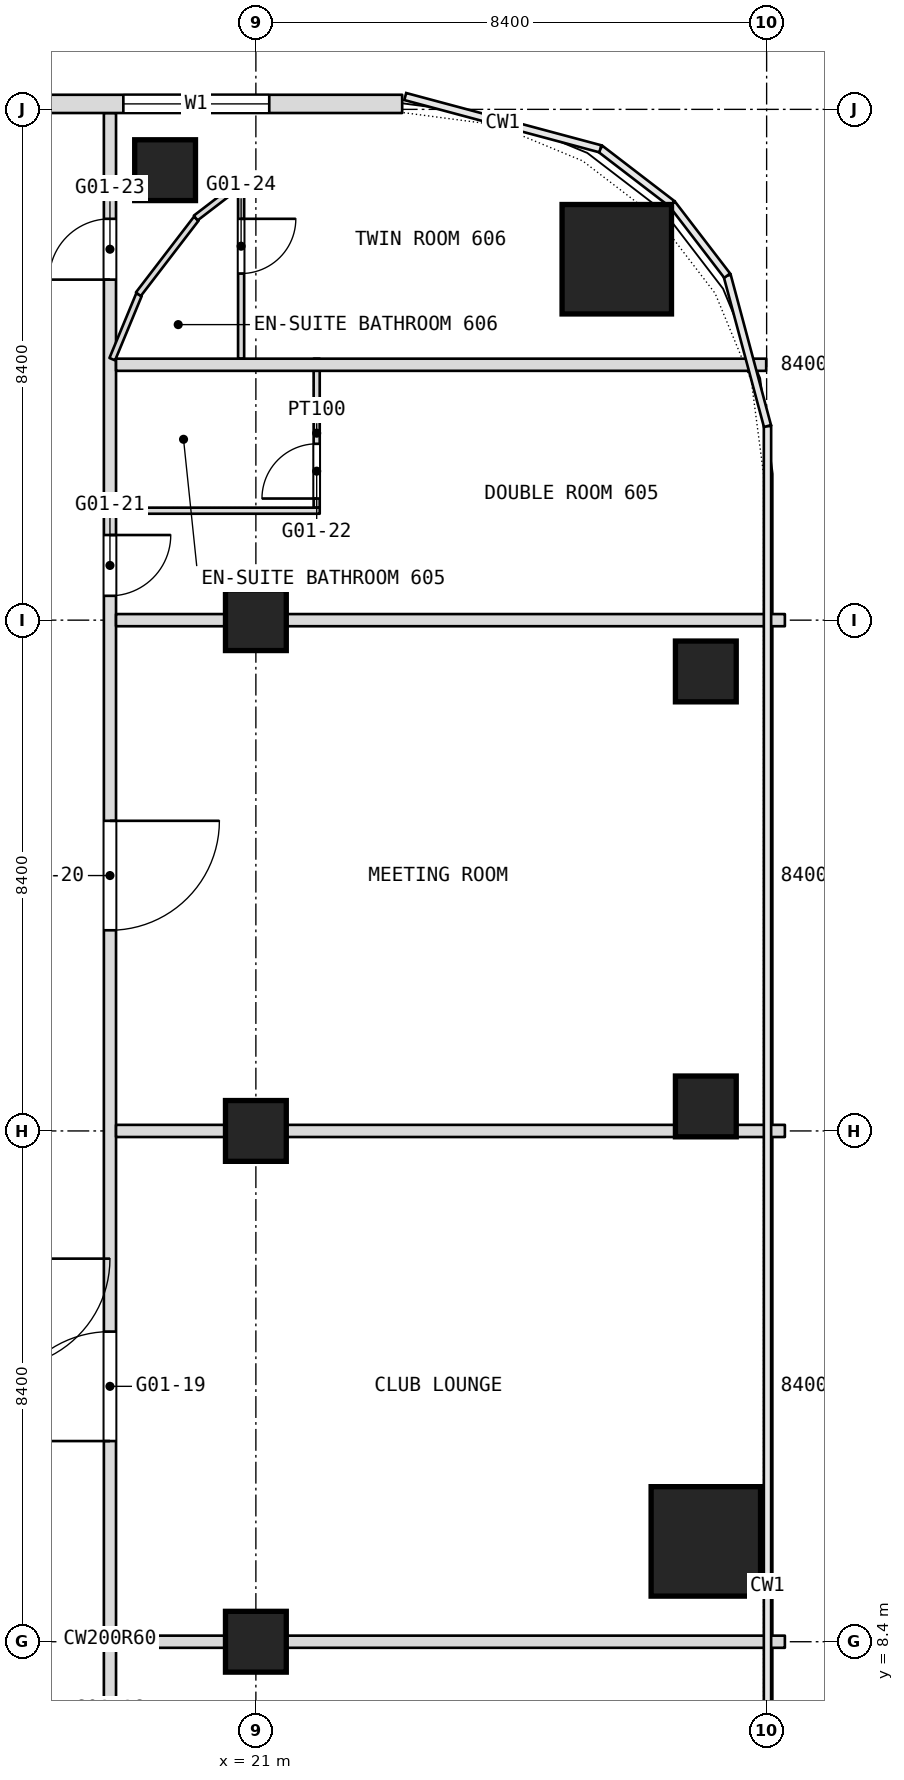
"""IFC4 building model, lengths in metres.
Left out: names, types, materials, properties, quantities, classifications, styles, units other than length and angle.
Written with IfcOpenShell. Run it as: python <this file> out.ifc"""

import sys

from ifc_helpers import new_model, si_unit, direction, frame, frame_2d, origin, origin_2d, place, context, subcontext, project, spatial, rectangle, extrude, element, fill, save


model = new_model("IFC4")
c1 = context("Model", 3, precision=1e-05, world=origin(), true_north=direction((0.0, 1.0)))
c2 = subcontext(c1, "Body", "Model", "MODEL_VIEW")
j1 = project(units=[si_unit("LENGTHUNIT", "METRE"), si_unit("PLANEANGLEUNIT", "RADIAN")], contexts=[c1])
p1 = place(None, origin())
s1 = spatial("IfcSite", under=j1, at=p1, CompositionType="ELEMENT")
p2 = place(p1, origin())
s2 = spatial("IfcBuilding", under=s1, at=p2, CompositionType="ELEMENT")
p3 = place(p2, frame((0.0, 0.0, 36.5)))
s3 = spatial("IfcBuildingStorey", under=s2, at=p3, CompositionType="ELEMENT", Elevation=36.5)
for number, where, z_axis, x_axis in (
    (1, (28.4, 10.05, 0.0), (0.0, 0.0, 1.0), (1.0, 0.0, 0.0)),
    (2, (26.936, 31.135, 0.0), (0.0, 0.0, 1.0), (1.0, 0.0, 0.0)),
):
    element("IfcColumn", number, at=place(p3, frame(where, z_axis=z_axis, x_axis=x_axis)), inside=s3, PredefinedType="COLUMN", context=c2, shape_type="SweptSolid", body=[
        extrude(rectangle(XDim=1.8, YDim=1.8, at=origin_2d()), origin(), (0.0, 0.0, 1.0), 3.6),
    ])
for number, where, z_axis, x_axis in (
    (3, (21.0, 8.4, 0.0), (0.0, 0.0, 1.0), (1.0, 0.0, 0.0)),
    (4, (21.0, 16.8, 0.0), (0.0, 0.0, 1.0), (1.0, 0.0, 0.0)),
    (5, (21.0, 25.2, 0.0), (0.0, 0.0, 1.0), (1.0, 0.0, 0.0)),
    (6, (19.507, 32.6, 0.0), (0.0, 0.0, 1.0), (1.0, 0.0, 0.0)),
    (7, (28.4, 24.356, 0.0), (0.0, 0.0, 1.0), (1.0, 0.0, 0.0)),
    (8, (28.4, 17.203, 0.0), (0.0, 0.0, 1.0), (1.0, 0.0, 0.0)),
):
    element("IfcColumn", number, at=place(p3, frame(where, z_axis=z_axis, x_axis=x_axis)), inside=s3, PredefinedType="COLUMN", context=c2, shape_type="SweptSolid", body=[
        extrude(rectangle(XDim=1.0, YDim=1.0, at=origin_2d()), origin(), (0.0, 0.0, 1.0), 3.6),
    ])
p4 = place(p3, frame((22.0, 27.05, 0.0), z_axis=(0.0, 0.0, 1.0), x_axis=(0.0, 1.0, 0.0)))
e9 = element("IfcWall", 9, at=p4, inside=s3, PredefinedType="PARTITIONING", context=c2, shape_type="SweptSolid", body=[
    extrude(rectangle(XDim=2.45, YDim=0.1, at=frame_2d((1.225, 0.0))), origin(), (0.0, 0.0, 1.0), 3.34),
])
p5 = place(p4, frame((0.15, 0.0, 0.0)))
e10 = element("IfcOpeningElement", 10, at=p5, cuts=e9, PredefinedType="OPENING", context=c2, shape_type="SweptSolid", body=[
    extrude(rectangle(XDim=0.9, YDim=2.1, at=frame_2d((0.45, 1.05))), frame((0.0, 0.05, 0.0), z_axis=(0.0, -1.0, 0.0), x_axis=(1.0, 0.0, 0.0)), (0.0, 0.0, 1.0), 0.1),
])
p6 = place(p3, frame((20.757, 29.5, 0.0), z_axis=(0.0, 0.0, 1.0), x_axis=(0.0, 1.0, 0.0)))
e11 = element("IfcWall", 11, at=p6, inside=s3, PredefinedType="PARTITIONING", context=c2, shape_type="SweptSolid", body=[
    extrude(rectangle(XDim=2.935, YDim=0.1, at=frame_2d((1.468, 0.0))), origin(), (0.0, 0.0, 1.0), 3.34),
])
p7 = place(p6, frame((1.4, 0.0, 0.0)))
e12 = element("IfcOpeningElement", 12, at=p7, cuts=e11, PredefinedType="OPENING", context=c2, shape_type="SweptSolid", body=[
    extrude(rectangle(XDim=0.9, YDim=2.1, at=frame_2d((0.45, 1.05))), frame((0.0, 0.05, 0.0), z_axis=(0.0, -1.0, 0.0), x_axis=(1.0, 0.0, 0.0)), (0.0, 0.0, 1.0), 0.1),
])
p8 = place(p3, frame((18.6, -16.665, 0.0), z_axis=(0.0, 0.0, 1.0), x_axis=(0.0, 1.0, 0.0)))
e13 = element("IfcWall", 13, at=p8, inside=s3, PredefinedType="PARTITIONING", context=c2, shape_type="SweptSolid", body=[
    extrude(rectangle(XDim=50.205, YDim=0.2, at=frame_2d((25.103, 0.0))), origin(), (0.0, 0.0, 1.0), 3.34),
])
p9 = place(p8, frame((2.991, 0.0, 0.0)))
e14 = element("IfcOpeningElement", 14, at=p9, cuts=e13, PredefinedType="OPENING", context=c2, shape_type="SweptSolid", body=[
    extrude(rectangle(XDim=1.0, YDim=2.1, at=frame_2d((0.5, 1.05))), frame((0.0, 0.1, 0.0), z_axis=(0.0, -1.0, 0.0), x_axis=(1.0, 0.0, 0.0)), (0.0, 0.0, 1.0), 0.2),
])
p10 = place(p8, frame((4.574, 0.0, 0.0)))
e15 = element("IfcOpeningElement", 15, at=p10, cuts=e13, PredefinedType="OPENING", context=c2, shape_type="SweptSolid", body=[
    extrude(rectangle(XDim=1.0, YDim=2.1, at=frame_2d((0.5, 1.05))), frame((0.0, 0.1, 0.0), z_axis=(0.0, -1.0, 0.0), x_axis=(1.0, 0.0, 0.0)), (0.0, 0.0, 1.0), 0.2),
])
p11 = place(p8, frame((11.865, 0.0, 0.0)))
e16 = element("IfcOpeningElement", 16, at=p11, cuts=e13, PredefinedType="OPENING", context=c2, shape_type="SweptSolid", body=[
    extrude(rectangle(XDim=1.1, YDim=2.1, at=frame_2d((0.55, 1.05))), frame((0.0, 0.1, 0.0), z_axis=(0.0, -1.0, 0.0), x_axis=(1.0, 0.0, 0.0)), (0.0, 0.0, 1.0), 0.2),
])
p12 = place(p8, frame((22.415, 0.0, 0.0)))
e17 = element("IfcOpeningElement", 17, at=p12, cuts=e13, PredefinedType="OPENING", context=c2, shape_type="SweptSolid", body=[
    extrude(rectangle(XDim=1.1, YDim=2.1, at=frame_2d((0.55, 1.05))), frame((0.0, 0.1, 0.0), z_axis=(0.0, -1.0, 0.0), x_axis=(1.0, 0.0, 0.0)), (0.0, 0.0, 1.0), 0.2),
])
p13 = place(p8, frame((28.365, 0.0, 0.0)))
e18 = element("IfcOpeningElement", 18, at=p13, cuts=e13, PredefinedType="OPENING", context=c2, shape_type="SweptSolid", body=[
    extrude(rectangle(XDim=1.8, YDim=2.1, at=frame_2d((0.9, 1.05))), frame((0.0, 0.1, 0.0), z_axis=(0.0, -1.0, 0.0), x_axis=(1.0, 0.0, 0.0)), (0.0, 0.0, 1.0), 0.2),
])
p14 = place(p8, frame((36.765, 0.0, 0.0)))
e19 = element("IfcOpeningElement", 19, at=p14, cuts=e13, PredefinedType="OPENING", context=c2, shape_type="SweptSolid", body=[
    extrude(rectangle(XDim=1.8, YDim=2.1, at=frame_2d((0.9, 1.05))), frame((0.0, 0.1, 0.0), z_axis=(0.0, -1.0, 0.0), x_axis=(1.0, 0.0, 0.0)), (0.0, 0.0, 1.0), 0.2),
])
p15 = place(p8, frame((42.265, 0.0, 0.0)))
e20 = element("IfcOpeningElement", 20, at=p15, cuts=e13, PredefinedType="OPENING", context=c2, shape_type="SweptSolid", body=[
    extrude(rectangle(XDim=1.0, YDim=2.1, at=frame_2d((0.5, 1.05))), frame((0.0, 0.1, 0.0), z_axis=(0.0, -1.0, 0.0), x_axis=(1.0, 0.0, 0.0)), (0.0, 0.0, 1.0), 0.2),
])
p16 = place(p8, frame((47.465, 0.0, 0.0)))
e21 = element("IfcOpeningElement", 21, at=p16, cuts=e13, PredefinedType="OPENING", context=c2, shape_type="SweptSolid", body=[
    extrude(rectangle(XDim=1.0, YDim=2.1, at=frame_2d((0.5, 1.05))), frame((0.0, 0.1, 0.0), z_axis=(0.0, -1.0, 0.0), x_axis=(1.0, 0.0, 0.0)), (0.0, 0.0, 1.0), 0.2),
])
p17 = place(p3, frame((18.638, 29.492, 0.0), z_axis=(0.0, 0.0, 1.0), x_axis=(0.382714431757, 0.923866691533, 0.0)))
e22 = element("IfcWall", 22, at=p17, inside=s3, PredefinedType="PARTITIONING", context=c2, shape_type="SweptSolid", body=[
    extrude(rectangle(XDim=1.149, YDim=0.1, at=frame_2d((0.575, 0.0))), origin(), (0.0, 0.0, 1.0), 3.34),
])
p18 = place(p3, frame((19.067, 30.56, 0.0), z_axis=(0.0, 0.0, 1.0), x_axis=(0.608519892166, 0.793538619626, 0.0)))
e23 = element("IfcWall", 23, at=p18, inside=s3, PredefinedType="PARTITIONING", context=c2, shape_type="SweptSolid", body=[
    extrude(rectangle(XDim=1.566, YDim=0.1, at=frame_2d((0.783, 0.0))), origin(), (0.0, 0.0, 1.0), 3.34),
])
p19 = place(p3, frame((18.7, 8.4, 0.0), z_axis=(0.0, 0.0, 1.0), x_axis=(1.0, 0.0, 0.0)))
e24 = element("IfcWall", 24, at=p19, inside=s3, PredefinedType="PARTITIONING", context=c2, shape_type="SweptSolid", body=[
    extrude(rectangle(XDim=11.0, YDim=0.2, at=frame_2d((5.5, 0.0))), origin(), (0.0, 0.0, 1.0), 2.84),
])
p20 = place(p3, frame((20.01, 31.813, 0.0), z_axis=(0.0, 0.0, 1.0), x_axis=(0.793641646693, 0.608385516457, 0.0)))
e25 = element("IfcWall", 25, at=p20, inside=s3, PredefinedType="PARTITIONING", context=c2, shape_type="SweptSolid", body=[
    extrude(rectangle(XDim=0.891, YDim=0.1, at=frame_2d((0.445, 0.0))), origin(), (0.0, 0.0, 1.0), 3.34),
])
for number, where, z_axis, x_axis in (
    (26, (18.7, 16.8, 0.0), (0.0, 0.0, 1.0), (1.0, 0.0, 0.0)),
    (27, (18.7, 25.2, 0.0), (0.0, 0.0, 1.0), (1.0, 0.0, 0.0)),
):
    element("IfcWall", number, at=place(p3, frame(where, z_axis=z_axis, x_axis=x_axis)), inside=s3, PredefinedType="PARTITIONING", context=c2, shape_type="SweptSolid", body=[
        extrude(rectangle(XDim=11.0, YDim=0.2, at=frame_2d((5.5, 0.0))), origin(), (0.0, 0.0, 1.0), 2.84),
    ])
p21 = place(p3, frame((18.7, 27.0, 0.0), z_axis=(0.0, 0.0, 1.0), x_axis=(1.0, 0.0, 0.0)))
e28 = element("IfcWall", 28, at=p21, inside=s3, PredefinedType="PARTITIONING", context=c2, shape_type="SweptSolid", body=[
    extrude(rectangle(XDim=3.35, YDim=0.1, at=frame_2d((1.675, 0.0))), origin(), (0.0, 0.0, 1.0), 3.34),
])
p22 = place(p3, frame((18.7, 29.4, 0.0), z_axis=(0.0, 0.0, 1.0), x_axis=(1.0, 0.0, 0.0)))
e29 = element("IfcWall", 29, at=p22, inside=s3, PredefinedType="PARTITIONING", context=c2, shape_type="SweptSolid", body=[
    extrude(rectangle(XDim=10.693, YDim=0.2, at=frame_2d((5.347, 0.0))), origin(), (0.0, 0.0, 1.0), 3.34),
])
p23 = place(p3, frame((23.406, 33.69, 0.0), z_axis=(0.0, 0.0, 1.0), x_axis=(-1.0, 0.0, 0.0)))
e30 = element("IfcWall", 30, at=p23, inside=s3, PredefinedType="NOTDEFINED", context=c2, shape_type="SweptSolid", body=[
    extrude(rectangle(XDim=46.812, YDim=0.3, at=frame_2d((23.406, 0.0))), origin(), (0.0, 0.0, 1.0), 3.6),
])
p24 = place(p23, frame((2.186, 0.0, 0.9)))
e31 = element("IfcOpeningElement", 31, at=p24, cuts=e30, PredefinedType="OPENING", context=c2, shape_type="SweptSolid", body=[
    extrude(rectangle(XDim=2.4, YDim=2.1, at=frame_2d((1.2, 1.05))), frame((0.0, 0.15, 0.0), z_axis=(0.0, -1.0, 0.0), x_axis=(1.0, 0.0, 0.0)), (0.0, 0.0, 1.0), 0.3),
])
p25 = place(p23, frame((7.506, 0.0, 0.9)))
e32 = element("IfcOpeningElement", 32, at=p25, cuts=e30, PredefinedType="OPENING", context=c2, shape_type="SweptSolid", body=[
    extrude(rectangle(XDim=2.4, YDim=2.1, at=frame_2d((1.2, 1.05))), frame((0.0, 0.15, 0.0), z_axis=(0.0, -1.0, 0.0), x_axis=(1.0, 0.0, 0.0)), (0.0, 0.0, 1.0), 0.3),
])
p26 = place(p23, frame((11.706, 0.0, 0.9)))
e33 = element("IfcOpeningElement", 33, at=p26, cuts=e30, PredefinedType="OPENING", context=c2, shape_type="SweptSolid", body=[
    extrude(rectangle(XDim=2.4, YDim=2.1, at=frame_2d((1.2, 1.05))), frame((0.0, 0.15, 0.0), z_axis=(0.0, -1.0, 0.0), x_axis=(1.0, 0.0, 0.0)), (0.0, 0.0, 1.0), 0.3),
])
p27 = place(p23, frame((15.906, 0.0, 0.9)))
e34 = element("IfcOpeningElement", 34, at=p27, cuts=e30, PredefinedType="OPENING", context=c2, shape_type="SweptSolid", body=[
    extrude(rectangle(XDim=2.4, YDim=2.1, at=frame_2d((1.2, 1.05))), frame((0.0, 0.15, 0.0), z_axis=(0.0, -1.0, 0.0), x_axis=(1.0, 0.0, 0.0)), (0.0, 0.0, 1.0), 0.3),
])
p28 = place(p23, frame((20.106, 0.0, 0.9)))
e35 = element("IfcOpeningElement", 35, at=p28, cuts=e30, PredefinedType="OPENING", context=c2, shape_type="SweptSolid", body=[
    extrude(rectangle(XDim=2.4, YDim=2.1, at=frame_2d((1.2, 1.05))), frame((0.0, 0.15, 0.0), z_axis=(0.0, -1.0, 0.0), x_axis=(1.0, 0.0, 0.0)), (0.0, 0.0, 1.0), 0.3),
])
p29 = place(p23, frame((24.306, 0.0, 0.9)))
e36 = element("IfcOpeningElement", 36, at=p29, cuts=e30, PredefinedType="OPENING", context=c2, shape_type="SweptSolid", body=[
    extrude(rectangle(XDim=2.4, YDim=2.1, at=frame_2d((1.2, 1.05))), frame((0.0, 0.15, 0.0), z_axis=(0.0, -1.0, 0.0), x_axis=(1.0, 0.0, 0.0)), (0.0, 0.0, 1.0), 0.3),
])
p30 = place(p23, frame((28.506, 0.0, 0.9)))
e37 = element("IfcOpeningElement", 37, at=p30, cuts=e30, PredefinedType="OPENING", context=c2, shape_type="SweptSolid", body=[
    extrude(rectangle(XDim=2.4, YDim=2.1, at=frame_2d((1.2, 1.05))), frame((0.0, 0.15, 0.0), z_axis=(0.0, -1.0, 0.0), x_axis=(1.0, 0.0, 0.0)), (0.0, 0.0, 1.0), 0.3),
])
p31 = place(p23, frame((32.706, 0.0, 0.9)))
e38 = element("IfcOpeningElement", 38, at=p31, cuts=e30, PredefinedType="OPENING", context=c2, shape_type="SweptSolid", body=[
    extrude(rectangle(XDim=2.4, YDim=2.1, at=frame_2d((1.2, 1.05))), frame((0.0, 0.15, 0.0), z_axis=(0.0, -1.0, 0.0), x_axis=(1.0, 0.0, 0.0)), (0.0, 0.0, 1.0), 0.3),
])
p32 = place(p23, frame((36.906, 0.0, 0.9)))
e39 = element("IfcOpeningElement", 39, at=p32, cuts=e30, PredefinedType="OPENING", context=c2, shape_type="SweptSolid", body=[
    extrude(rectangle(XDim=2.4, YDim=2.1, at=frame_2d((1.2, 1.05))), frame((0.0, 0.15, 0.0), z_axis=(0.0, -1.0, 0.0), x_axis=(1.0, 0.0, 0.0)), (0.0, 0.0, 1.0), 0.3),
])
p33 = place(p23, frame((42.226, 0.0, 0.9)))
e40 = element("IfcOpeningElement", 40, at=p33, cuts=e30, PredefinedType="OPENING", context=c2, shape_type="SweptSolid", body=[
    extrude(rectangle(XDim=2.4, YDim=2.1, at=frame_2d((1.2, 1.05))), frame((0.0, 0.15, 0.0), z_axis=(0.0, -1.0, 0.0), x_axis=(1.0, 0.0, 0.0)), (0.0, 0.0, 1.0), 0.3),
])
p34 = place(p5, origin())
e41 = element("IfcDoor", 41, at=p34, inside=s3, OperationType="SINGLE_SWING_LEFT", PredefinedType="DOOR", context=c2, shape_type="SweptSolid", body=[
    extrude(rectangle(XDim=0.9, YDim=2.1, at=frame_2d((0.45, 1.05))), frame((0.0, 0.025, 0.0), z_axis=(0.0, -1.0, 0.0), x_axis=(1.0, 0.0, 0.0)), (0.0, 0.0, 1.0), 0.05),
])
fill(e10, e41)
p35 = place(p7, origin())
e42 = element("IfcDoor", 42, at=p35, inside=s3, OperationType="SINGLE_SWING_RIGHT", PredefinedType="DOOR", context=c2, shape_type="SweptSolid", body=[
    extrude(rectangle(XDim=0.9, YDim=2.1, at=frame_2d((0.45, 1.05))), frame((0.0, 0.025, 0.0), z_axis=(0.0, -1.0, 0.0), x_axis=(1.0, 0.0, 0.0)), (0.0, 0.0, 1.0), 0.05),
])
fill(e12, e42)
p36 = place(p13, origin())
e43 = element("IfcDoor", 43, at=p36, inside=s3, OperationType="DOUBLE_DOOR_SINGLE_SWING", PredefinedType="DOOR", context=c2, shape_type="SweptSolid", body=[
    extrude(rectangle(XDim=1.8, YDim=2.1, at=frame_2d((0.9, 1.05))), frame((0.0, 0.025, 0.0), z_axis=(0.0, -1.0, 0.0), x_axis=(1.0, 0.0, 0.0)), (0.0, 0.0, 1.0), 0.05),
])
fill(e18, e43)
p37 = place(p14, origin())
e44 = element("IfcDoor", 44, at=p37, inside=s3, OperationType="DOUBLE_DOOR_SINGLE_SWING", PredefinedType="DOOR", context=c2, shape_type="SweptSolid", body=[
    extrude(rectangle(XDim=1.8, YDim=2.1, at=frame_2d((0.9, 1.05))), frame((0.0, 0.025, 0.0), z_axis=(0.0, -1.0, 0.0), x_axis=(1.0, 0.0, 0.0)), (0.0, 0.0, 1.0), 0.05),
])
fill(e19, e44)
p38 = place(p15, origin())
e45 = element("IfcDoor", 45, at=p38, inside=s3, OperationType="SINGLE_SWING_LEFT", PredefinedType="DOOR", context=c2, shape_type="SweptSolid", body=[
    extrude(rectangle(XDim=1.0, YDim=2.1, at=frame_2d((0.5, 1.05))), frame((0.0, 0.025, 0.0), z_axis=(0.0, -1.0, 0.0), x_axis=(1.0, 0.0, 0.0)), (0.0, 0.0, 1.0), 0.05),
])
fill(e20, e45)
p39 = place(p16, origin())
e46 = element("IfcDoor", 46, at=p39, inside=s3, OperationType="SINGLE_SWING_LEFT", PredefinedType="DOOR", context=c2, shape_type="SweptSolid", body=[
    extrude(rectangle(XDim=1.0, YDim=2.1, at=frame_2d((0.5, 1.05))), frame((0.0, 0.025, 0.0), z_axis=(0.0, -1.0, 0.0), x_axis=(1.0, 0.0, 0.0)), (0.0, 0.0, 1.0), 0.05),
])
fill(e21, e46)
p40 = place(p24, origin())
e47 = element("IfcWindow", 47, at=p40, inside=s3, PartitioningType="SINGLE_PANEL", PredefinedType="WINDOW", context=c2, shape_type="SweptSolid", body=[
    extrude(rectangle(XDim=2.4, YDim=2.1, at=frame_2d((1.2, 1.05))), frame((0.0, 0.03, 0.0), z_axis=(0.0, -1.0, 0.0), x_axis=(1.0, 0.0, 0.0)), (0.0, 0.0, 1.0), 0.06),
])
fill(e31, e47)
save(model, sys.argv[1])
